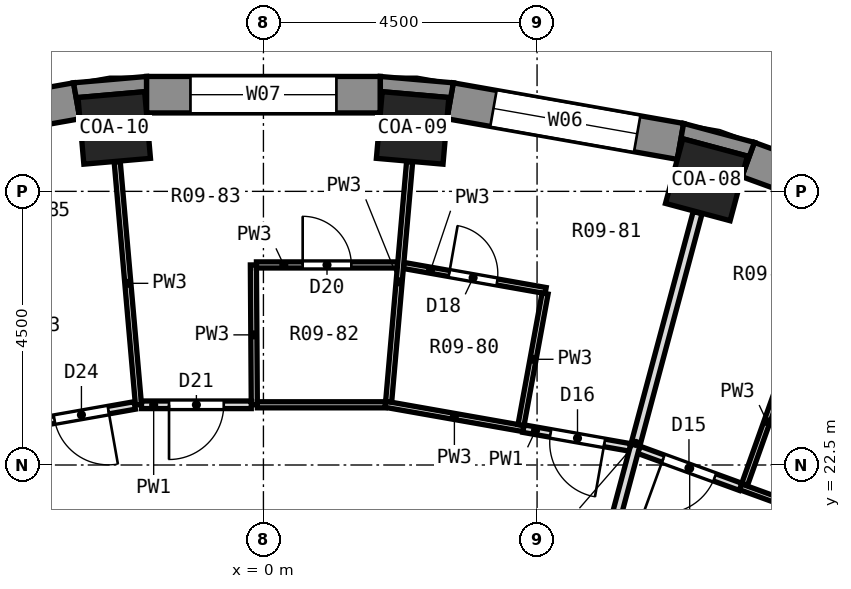
"""IFC4 building model, lengths in metres.
Left out: names, types, materials, properties, quantities, classifications, styles, units other than length and angle.
Written with IfcOpenShell. Run it as: python <this file> out.ifc"""

import sys

from ifc_helpers import new_model, si_unit, direction, frame, frame_2d, origin, origin_2d, place, context, subcontext, project, spatial, polyline, rectangle, outline, extrude, element, fill, save


model = new_model("IFC4")
c1 = context("Model", 3, precision=1e-05, world=origin(), true_north=direction((0.0, 1.0)))
c2 = subcontext(c1, "Body", "Model", "MODEL_VIEW")
j1 = project(units=[si_unit("LENGTHUNIT", "METRE"), si_unit("PLANEANGLEUNIT", "RADIAN")], contexts=[c1])
p1 = place(None, origin())
s1 = spatial("IfcSite", under=j1, at=p1, CompositionType="ELEMENT")
p2 = place(p1, origin())
s2 = spatial("IfcBuilding", under=s1, at=p2, CompositionType="ELEMENT")
p3 = place(p2, frame((0.0, 0.0, 26.3)))
s3 = spatial("IfcBuildingStorey", under=s2, at=p3, CompositionType="ELEMENT", Elevation=26.3)
for number, where, z_axis, x_axis in (
    (1, (7.286, 27.191, -1.05), (0.0, 0.0, 1.0), (0.259, 0.966, 0.0)),
    (2, (2.453, 28.043, -1.05), (0.0, 0.0, 1.0), (0.087, 0.996, 0.0)),
    (3, (-2.453, 28.043, -1.05), (0.0, 0.0, 1.0), (-0.087, 0.996, 0.0)),
):
    element("IfcColumn", number, at=place(p3, frame(where, z_axis=z_axis, x_axis=x_axis)), inside=s3, PredefinedType="COLUMN", context=c2, shape_type="SweptSolid", body=[
        extrude(rectangle(XDim=1.1, YDim=1.1, at=origin_2d()), origin(), (0.0, 0.0, 1.0), 4.35),
    ])
p4 = place(p3, frame((11.585, 26.208, 0.0), z_axis=(0.0, 0.0, 1.0), x_axis=(-0.939689588564, 0.342028474173, 0.0)))
e4 = element("IfcWall", 4, at=p4, inside=s3, PredefinedType="SOLIDWALL", context=c2, shape_type="SweptSolid", body=[
    extrude(rectangle(XDim=3.846, YDim=0.6, at=frame_2d((1.923, 0.0))), origin(), (0.0, 0.0, 1.0), 2.75),
])
p5 = place(p4, frame((0.723, 0.0, 0.9)))
e5 = element("IfcOpeningElement", 5, at=p5, cuts=e4, PredefinedType="OPENING", context=c2, shape_type="SweptSolid", body=[
    extrude(rectangle(XDim=2.4, YDim=1.8, at=frame_2d((1.2, 0.9))), frame((0.0, 0.312, 0.0), z_axis=(0.0, -1.0, 0.0), x_axis=(1.0, 0.0, 0.0)), (0.0, 0.0, 1.0), 0.624),
])
p6 = place(p3, frame((6.858, 27.821, 0.0), z_axis=(0.0, 0.0, 1.0), x_axis=(-0.984800809218, 0.173687553279, 0.0)))
e6 = element("IfcWall", 6, at=p6, inside=s3, PredefinedType="SOLIDWALL", context=c2, shape_type="SweptSolid", body=[
    extrude(rectangle(XDim=3.846, YDim=0.6, at=frame_2d((1.923, 0.0))), origin(), (0.0, 0.0, 1.0), 2.75),
])
p7 = place(p6, frame((0.723, 0.0, 0.9)))
e7 = element("IfcOpeningElement", 7, at=p7, cuts=e6, PredefinedType="OPENING", context=c2, shape_type="SweptSolid", body=[
    extrude(rectangle(XDim=2.4, YDim=1.8, at=frame_2d((1.2, 0.9))), frame((0.0, 0.312, 0.0), z_axis=(0.0, -1.0, 0.0), x_axis=(1.0, 0.0, 0.0)), (0.0, 0.0, 1.0), 0.624),
])
p8 = place(p3, frame((1.923, 28.59, 0.0), z_axis=(0.0, 0.0, 1.0), x_axis=(-1.0, 0.0, 0.0)))
e8 = element("IfcWall", 8, at=p8, inside=s3, PredefinedType="SOLIDWALL", context=c2, shape_type="SweptSolid", body=[
    extrude(rectangle(XDim=3.846, YDim=0.6, at=frame_2d((1.923, 0.0))), origin(), (0.0, 0.0, 1.0), 2.75),
])
p9 = place(p8, frame((0.723, 0.0, 0.9)))
e9 = element("IfcOpeningElement", 9, at=p9, cuts=e8, PredefinedType="OPENING", context=c2, shape_type="SweptSolid", body=[
    extrude(rectangle(XDim=2.4, YDim=1.8, at=frame_2d((1.2, 0.9))), frame((0.0, 0.312, 0.0), z_axis=(0.0, -1.0, 0.0), x_axis=(1.0, 0.0, 0.0)), (0.0, 0.0, 1.0), 0.624),
])
p10 = place(p3, frame((-3.071, 28.489, 0.0), z_axis=(0.0, 0.0, 1.0), x_axis=(-0.984800809218, -0.173687553279, 0.0)))
e10 = element("IfcWall", 10, at=p10, inside=s3, PredefinedType="SOLIDWALL", context=c2, shape_type="SweptSolid", body=[
    extrude(rectangle(XDim=3.846, YDim=0.6, at=frame_2d((1.923, 0.0))), origin(), (0.0, 0.0, 1.0), 2.75),
])
p11 = place(p10, frame((0.723, 0.0, 0.9)))
e11 = element("IfcOpeningElement", 11, at=p11, cuts=e10, PredefinedType="OPENING", context=c2, shape_type="SweptSolid", body=[
    extrude(rectangle(XDim=2.4, YDim=1.8, at=frame_2d((1.2, 0.9))), frame((0.0, 0.312, 0.0), z_axis=(0.0, -1.0, 0.0), x_axis=(1.0, 0.0, 0.0)), (0.0, 0.0, 1.0), 0.624),
])
p12 = place(p3, origin())
e12 = element("IfcWall", 12, at=p12, inside=s3, PredefinedType="SOLIDWALL", context=c2, shape_type="SweptSolid", body=[
    extrude(outline(polyline([(6.91, 28.117), (6.806, 27.526), (6.897, 27.865), (7.959, 27.58), (7.869, 27.241), (8.074, 27.805), (6.91, 28.117)])), origin(), (0.0, 0.0, 1.0), 2.75),
])
p13 = place(p3, origin())
e13 = element("IfcWall", 13, at=p13, inside=s3, PredefinedType="SOLIDWALL", context=c2, shape_type="SweptSolid", body=[
    extrude(outline(polyline([(3.123, 28.785), (1.923, 28.89), (1.923, 28.29), (1.954, 28.639), (3.049, 28.543), (3.019, 28.194), (3.123, 28.785)])), origin(), (0.0, 0.0, 1.0), 2.75),
])
p14 = place(p3, origin())
e14 = element("IfcWall", 14, at=p14, inside=s3, PredefinedType="SOLIDWALL", context=c2, shape_type="SweptSolid", body=[
    extrude(outline(polyline([(-1.923, 28.89), (-3.123, 28.785), (-3.019, 28.194), (-3.049, 28.543), (-1.954, 28.639), (-1.923, 28.29), (-1.923, 28.89)])), origin(), (0.0, 0.0, 1.0), 2.75),
])
p15 = place(p3, frame((-0.165, 25.79, 0.0), z_axis=(0.0, 0.0, 1.0), x_axis=(0.006580899844, -0.999978345644, 0.0)))
e15 = element("IfcWall", 15, at=p15, inside=s3, PredefinedType="PARTITIONING", context=c2, shape_type="SweptSolid", body=[
    extrude(rectangle(XDim=2.3, YDim=0.1, at=frame_2d((1.15, 0.0))), origin(), (0.0, 0.0, 1.0), 2.75),
])
p16 = place(p3, frame((-2.405, 27.485, 0.0), z_axis=(0.0, 0.0, 1.0), x_axis=(0.087176012461, -0.996192924514, 0.0)))
e16 = element("IfcWall", 16, at=p16, inside=s3, PredefinedType="PARTITIONING", context=c2, shape_type="SweptSolid", body=[
    extrude(rectangle(XDim=4.01, YDim=0.1, at=frame_2d((2.005, 0.0))), origin(), (0.0, 0.0, 1.0), 2.75),
])
p17 = place(p3, frame((7.846, 22.141, 0.0), z_axis=(0.0, 0.0, 1.0), x_axis=(0.939712116987, -0.341966573204, 0.0)))
e17 = element("IfcWall", 17, at=p17, inside=s3, PredefinedType="PARTITIONING", context=c2, shape_type="SweptSolid", body=[
    extrude(rectangle(XDim=2.192, YDim=0.1, at=frame_2d((1.096, 0.0))), origin(), (0.0, 0.0, 1.0), 2.75),
])
p18 = place(p3, frame((6.174, 22.75, 0.0), z_axis=(0.0, 0.0, 1.0), x_axis=(0.939613069721, -0.342238629044, 0.0)))
e18 = element("IfcWall", 18, at=p18, inside=s3, PredefinedType="PARTITIONING", context=c2, shape_type="SweptSolid", body=[
    extrude(rectangle(XDim=1.78, YDim=0.125, at=frame_2d((0.89, 0.0))), origin(), (0.0, 0.0, 1.0), 2.75),
])
p19 = place(p18, frame((0.427, 0.0, 0.0)))
e19 = element("IfcOpeningElement", 19, at=p19, cuts=e18, PredefinedType="OPENING", context=c2, shape_type="SweptSolid", body=[
    extrude(rectangle(XDim=0.9, YDim=2.1, at=frame_2d((0.45, 1.05))), frame((0.0, 0.074, 0.0), z_axis=(0.0, -1.0, 0.0), x_axis=(1.0, 0.0, 0.0)), (0.0, 0.0, 1.0), 0.149),
])
p20 = place(p3, frame((2.005, 23.499, 0.0), z_axis=(0.0, 0.0, 1.0), x_axis=(0.984814448646, -0.173610200557, 0.0)))
e20 = element("IfcWall", 20, at=p20, inside=s3, PredefinedType="PARTITIONING", context=c2, shape_type="SweptSolid", body=[
    extrude(rectangle(XDim=2.306, YDim=0.1, at=frame_2d((1.153, 0.0))), origin(), (0.0, 0.0, 1.0), 2.75),
])
p21 = place(p3, frame((4.276, 23.098, 0.0), z_axis=(0.0, 0.0, 1.0), x_axis=(0.984784939559, -0.173777509529, 0.0)))
e21 = element("IfcWall", 21, at=p21, inside=s3, PredefinedType="PARTITIONING", context=c2, shape_type="SweptSolid", body=[
    extrude(rectangle(XDim=1.78, YDim=0.125, at=frame_2d((0.89, 0.0))), origin(), (0.0, 0.0, 1.0), 2.75),
])
p22 = place(p21, frame((0.452, 0.0, 0.0)))
e22 = element("IfcOpeningElement", 22, at=p22, cuts=e21, PredefinedType="OPENING", context=c2, shape_type="SweptSolid", body=[
    extrude(rectangle(XDim=0.9, YDim=2.1, at=frame_2d((0.45, 1.05))), frame((0.0, 0.074, 0.0), z_axis=(0.0, -1.0, 0.0), x_axis=(1.0, 0.0, 0.0)), (0.0, 0.0, 1.0), 0.149),
])
p23 = place(p3, frame((2.305, 25.781, 0.0), z_axis=(0.0, 0.0, 1.0), x_axis=(0.984774232096, -0.17383817705, 0.0)))
e23 = element("IfcWall", 23, at=p23, inside=s3, PredefinedType="PARTITIONING", context=c2, shape_type="SweptSolid", body=[
    extrude(rectangle(XDim=2.372, YDim=0.1, at=frame_2d((1.186, 0.0))), origin(), (0.0, 0.0, 1.0), 2.75),
])
p24 = place(p23, frame((0.761, 0.0, 0.0)))
e24 = element("IfcOpeningElement", 24, at=p24, cuts=e23, PredefinedType="OPENING", context=c2, shape_type="SweptSolid", body=[
    extrude(rectangle(XDim=0.8, YDim=2.1, at=frame_2d((0.4, 1.05))), frame((0.0, 0.062, 0.0), z_axis=(0.0, -1.0, 0.0), x_axis=(1.0, 0.0, 0.0)), (0.0, 0.0, 1.0), 0.124),
])
p25 = place(p3, frame((-0.1, 23.49, 0.0), z_axis=(0.0, 0.0, 1.0), x_axis=(1.0, 0.0, 0.0)))
e25 = element("IfcWall", 25, at=p25, inside=s3, PredefinedType="PARTITIONING", context=c2, shape_type="SweptSolid", body=[
    extrude(rectangle(XDim=2.105, YDim=0.1, at=frame_2d((1.052, 0.0))), origin(), (0.0, 0.0, 1.0), 2.75),
])
p26 = place(p3, frame((-2.005, 23.49, 0.0), z_axis=(0.0, 0.0, 1.0), x_axis=(1.0, 0.0, 0.0)))
e26 = element("IfcWall", 26, at=p26, inside=s3, PredefinedType="PARTITIONING", context=c2, shape_type="SweptSolid", body=[
    extrude(rectangle(XDim=1.805, YDim=0.125, at=frame_2d((0.902, 0.0))), origin(), (0.0, 0.0, 1.0), 2.75),
])
p27 = place(p26, frame((0.452, 0.0, 0.0)))
e27 = element("IfcOpeningElement", 27, at=p27, cuts=e26, PredefinedType="OPENING", context=c2, shape_type="SweptSolid", body=[
    extrude(rectangle(XDim=0.9, YDim=2.1, at=frame_2d((0.45, 1.05))), frame((0.0, 0.074, 0.0), z_axis=(0.0, -1.0, 0.0), x_axis=(1.0, 0.0, 0.0)), (0.0, 0.0, 1.0), 0.149),
])
p28 = place(p3, frame((-0.115, 25.79, 0.0), z_axis=(0.0, 0.0, 1.0), x_axis=(1.0, 0.0, 0.0)))
e28 = element("IfcWall", 28, at=p28, inside=s3, PredefinedType="PARTITIONING", context=c2, shape_type="SweptSolid", body=[
    extrude(rectangle(XDim=2.321, YDim=0.1, at=frame_2d((1.161, 0.0))), origin(), (0.0, 0.0, 1.0), 2.75),
])
p29 = place(p28, frame((0.76, 0.0, 0.0)))
e29 = element("IfcOpeningElement", 29, at=p29, cuts=e28, PredefinedType="OPENING", context=c2, shape_type="SweptSolid", body=[
    extrude(rectangle(XDim=0.8, YDim=2.1, at=frame_2d((0.4, 1.05))), frame((0.0, 0.062, 0.0), z_axis=(0.0, -1.0, 0.0), x_axis=(1.0, 0.0, 0.0)), (0.0, 0.0, 1.0), 0.124),
])
p30 = place(p3, frame((-3.882, 23.168, 0.0), z_axis=(0.0, 0.0, 1.0), x_axis=(0.984784929821, 0.173777564715, 0.0)))
e30 = element("IfcWall", 30, at=p30, inside=s3, PredefinedType="PARTITIONING", context=c2, shape_type="SweptSolid", body=[
    extrude(rectangle(XDim=1.793, YDim=0.125, at=frame_2d((0.896, 0.0))), origin(), (0.0, 0.0, 1.0), 2.75),
])
p31 = place(p30, frame((0.452, 0.0, 0.0)))
e31 = element("IfcOpeningElement", 31, at=p31, cuts=e30, PredefinedType="OPENING", context=c2, shape_type="SweptSolid", body=[
    extrude(rectangle(XDim=0.9, YDim=2.1, at=frame_2d((0.45, 1.05))), frame((0.0, 0.074, 0.0), z_axis=(0.0, -1.0, 0.0), x_axis=(1.0, 0.0, 0.0)), (0.0, 0.0, 1.0), 0.149),
])
p32 = place(p3, frame((7.914, 22.183, 0.0), z_axis=(0.0, 0.0, 1.0), x_axis=(0.335940567571, 0.941883185464, 0.0)))
e32 = element("IfcWall", 32, at=p32, inside=s3, PredefinedType="PARTITIONING", context=c2, shape_type="SweptSolid", body=[
    extrude(rectangle(XDim=2.188, YDim=0.1, at=frame_2d((1.094, 0.0))), origin(), (0.0, 0.0, 1.0), 2.75),
])
p33 = place(p3, frame((5.107, 19.06, 0.0), z_axis=(0.0, 0.0, 1.0), x_axis=(0.258797692258, 0.965931547513, 0.0)))
e33 = element("IfcWall", 33, at=p33, inside=s3, PredefinedType="PARTITIONING", context=c2, shape_type="SweptSolid", body=[
    extrude(rectangle(XDim=7.857, YDim=0.15, at=frame_2d((3.929, 0.0))), origin(), (0.0, 0.0, 1.0), 2.75),
])
p34 = place(p3, frame((4.236, 23.156, 0.0), z_axis=(0.0, 0.0, 1.0), x_axis=(0.180037913286, 0.983659671726, 0.0)))
e34 = element("IfcWall", 34, at=p34, inside=s3, PredefinedType="PARTITIONING", context=c2, shape_type="SweptSolid", body=[
    extrude(rectangle(XDim=2.199, YDim=0.1, at=frame_2d((1.1, 0.0))), origin(), (0.0, 0.0, 1.0), 2.75),
])
p35 = place(p3, frame((2.059, 23.54, 0.0), z_axis=(0.0, 0.0, 1.0), x_axis=(0.087044593785, 0.996204416118, 0.0)))
e35 = element("IfcWall", 35, at=p35, inside=s3, PredefinedType="PARTITIONING", context=c2, shape_type="SweptSolid", body=[
    extrude(rectangle(XDim=3.96, YDim=0.1, at=frame_2d((1.98, 0.0))), origin(), (0.0, 0.0, 1.0), 2.75),
])
p36 = place(p7, origin())
e36 = element("IfcWindow", 36, at=p36, inside=s3, PartitioningType="SINGLE_PANEL", PredefinedType="WINDOW", context=c2, shape_type="SweptSolid", body=[
    extrude(rectangle(XDim=2.4, YDim=1.8, at=frame_2d((1.2, 0.9))), frame((0.0, 0.18, 0.0), z_axis=(0.0, -1.0, 0.0), x_axis=(1.0, 0.0, 0.0)), (0.0, 0.0, 1.0), 0.06),
])
fill(e7, e36)
p37 = place(p9, origin())
e37 = element("IfcWindow", 37, at=p37, inside=s3, PartitioningType="SINGLE_PANEL", PredefinedType="WINDOW", context=c2, shape_type="SweptSolid", body=[
    extrude(rectangle(XDim=2.4, YDim=1.8, at=frame_2d((1.2, 0.9))), frame((0.0, 0.18, 0.0), z_axis=(0.0, -1.0, 0.0), x_axis=(1.0, 0.0, 0.0)), (0.0, 0.0, 1.0), 0.06),
])
fill(e9, e37)
p38 = place(p19, frame((0.9, 0.0, 0.0), z_axis=(0.0, 0.0, 1.0), x_axis=(-1.0, 0.0, 0.0)))
e38 = element("IfcDoor", 38, at=p38, inside=s3, OperationType="SINGLE_SWING_RIGHT", PredefinedType="DOOR", context=c2, shape_type="SweptSolid", body=[
    extrude(rectangle(XDim=0.9, YDim=2.1, at=frame_2d((0.45, 1.05))), frame((0.0, 0.025, 0.0), z_axis=(0.0, -1.0, 0.0), x_axis=(1.0, 0.0, 0.0)), (0.0, 0.0, 1.0), 0.05),
])
fill(e19, e38)
p39 = place(p22, frame((0.9, 0.0, 0.0), z_axis=(0.0, 0.0, 1.0), x_axis=(-1.0, 0.0, 0.0)))
e39 = element("IfcDoor", 39, at=p39, inside=s3, OperationType="SINGLE_SWING_LEFT", PredefinedType="DOOR", context=c2, shape_type="SweptSolid", body=[
    extrude(rectangle(XDim=0.9, YDim=2.1, at=frame_2d((0.45, 1.05))), frame((0.0, 0.025, 0.0), z_axis=(0.0, -1.0, 0.0), x_axis=(1.0, 0.0, 0.0)), (0.0, 0.0, 1.0), 0.05),
])
fill(e22, e39)
p40 = place(p24, origin())
e40 = element("IfcDoor", 40, at=p40, inside=s3, OperationType="SINGLE_SWING_LEFT", PredefinedType="DOOR", context=c2, shape_type="SweptSolid", body=[
    extrude(rectangle(XDim=0.8, YDim=2.1, at=frame_2d((0.4, 1.05))), frame((0.0, 0.025, 0.0), z_axis=(0.0, -1.0, 0.0), x_axis=(1.0, 0.0, 0.0)), (0.0, 0.0, 1.0), 0.05),
])
fill(e24, e40)
p41 = place(p29, origin())
e41 = element("IfcDoor", 41, at=p41, inside=s3, OperationType="SINGLE_SWING_LEFT", PredefinedType="DOOR", context=c2, shape_type="SweptSolid", body=[
    extrude(rectangle(XDim=0.8, YDim=2.1, at=frame_2d((0.4, 1.05))), frame((0.0, 0.025, 0.0), z_axis=(0.0, -1.0, 0.0), x_axis=(1.0, 0.0, 0.0)), (0.0, 0.0, 1.0), 0.05),
])
fill(e29, e41)
p42 = place(p27, frame((0.9, 0.0, 0.0), z_axis=(0.0, 0.0, 1.0), x_axis=(-1.0, 0.0, 0.0)))
e42 = element("IfcDoor", 42, at=p42, inside=s3, OperationType="SINGLE_SWING_RIGHT", PredefinedType="DOOR", context=c2, shape_type="SweptSolid", body=[
    extrude(rectangle(XDim=0.9, YDim=2.1, at=frame_2d((0.45, 1.05))), frame((0.0, 0.025, 0.0), z_axis=(0.0, -1.0, 0.0), x_axis=(1.0, 0.0, 0.0)), (0.0, 0.0, 1.0), 0.05),
])
fill(e27, e42)
p43 = place(p31, frame((0.9, 0.0, 0.0), z_axis=(0.0, 0.0, 1.0), x_axis=(-1.0, 0.0, 0.0)))
e43 = element("IfcDoor", 43, at=p43, inside=s3, OperationType="SINGLE_SWING_LEFT", PredefinedType="DOOR", context=c2, shape_type="SweptSolid", body=[
    extrude(rectangle(XDim=0.9, YDim=2.1, at=frame_2d((0.45, 1.05))), frame((0.0, 0.025, 0.0), z_axis=(0.0, -1.0, 0.0), x_axis=(1.0, 0.0, 0.0)), (0.0, 0.0, 1.0), 0.05),
])
fill(e31, e43)
save(model, sys.argv[1])
